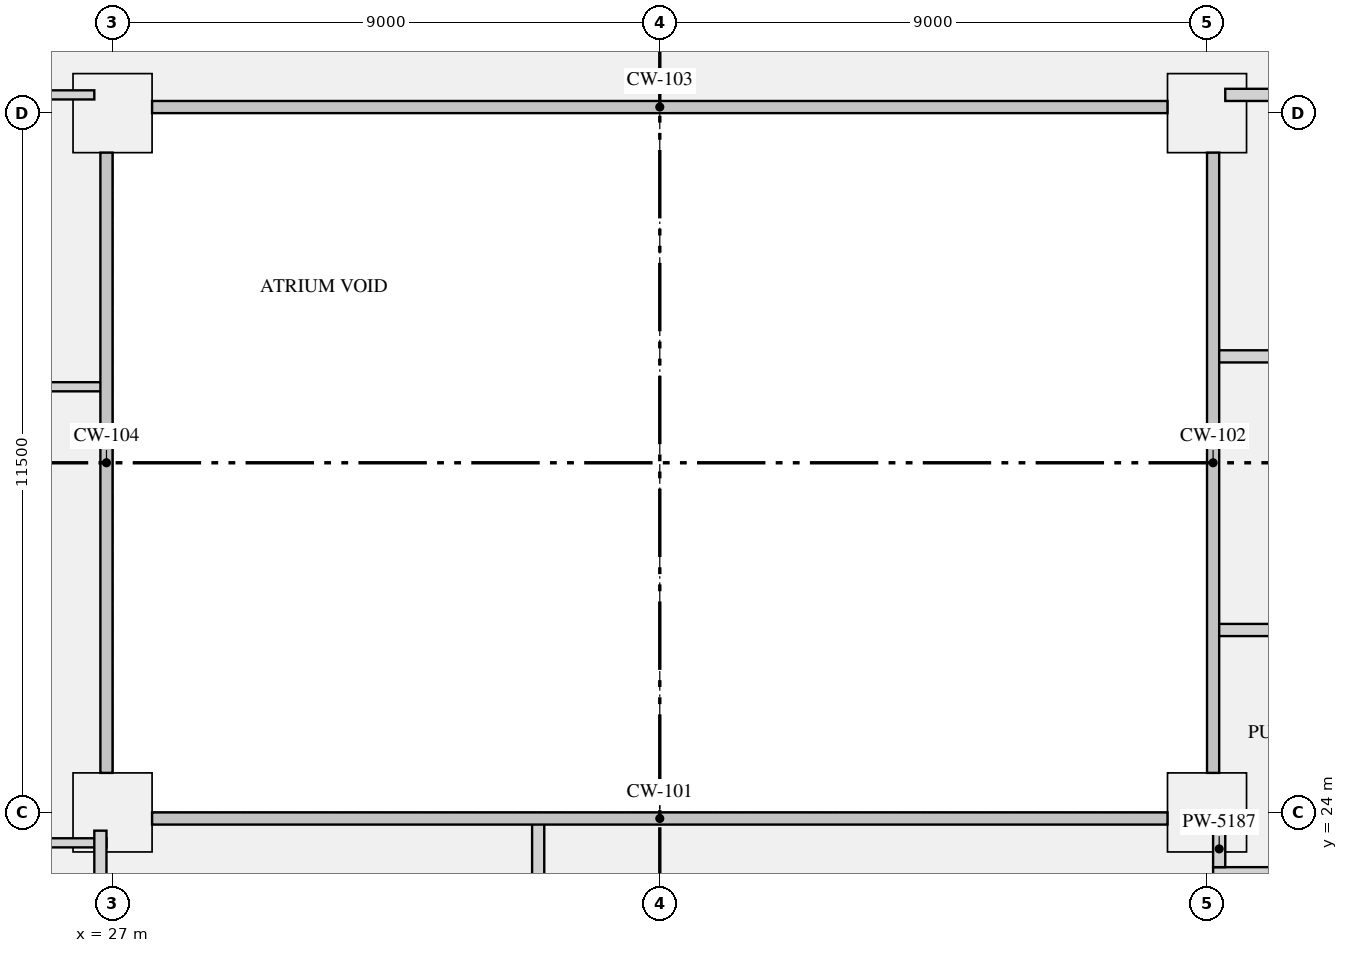
"""IFC4 building model, lengths in metres.
Left out: names, types, materials, properties, quantities, classifications, styles, units other than length and angle.
Written with IfcOpenShell. Run it as: python <this file> out.ifc"""

import sys

from ifc_helpers import new_model, si_unit, direction, frame, frame_2d, origin, origin_2d, place, context, subcontext, project, spatial, rectangle, extrude, element, save


model = new_model("IFC4")
c1 = context("Model", 3, precision=1e-05, world=origin(), true_north=direction((0.0, 1.0)))
c2 = subcontext(c1, "Body", "Model", "MODEL_VIEW")
j1 = project(units=[si_unit("LENGTHUNIT", "METRE"), si_unit("PLANEANGLEUNIT", "RADIAN")], contexts=[c1])
p1 = place(None, origin())
s1 = spatial("IfcSite", under=j1, at=p1, CompositionType="ELEMENT")
p2 = place(p1, origin())
s2 = spatial("IfcBuilding", under=s1, at=p2, CompositionType="ELEMENT")
p3 = place(p2, frame((0.0, 0.0, 137.1)))
s3 = spatial("IfcBuildingStorey", under=s2, at=p3, CompositionType="ELEMENT", Elevation=137.1)
for number, where, z_axis, x_axis in (
    (1, (27.0, 24.0, 0.0), (0.0, 0.0, 1.0), (1.0, 0.0, 0.0)),
    (2, (45.0, 24.0, 0.0), (0.0, 0.0, 1.0), (1.0, 0.0, 0.0)),
    (3, (27.0, 35.5, 0.0), (0.0, 0.0, 1.0), (1.0, 0.0, 0.0)),
    (4, (45.0, 35.5, 0.0), (0.0, 0.0, 1.0), (1.0, 0.0, 0.0)),
):
    element("IfcColumn", number, at=place(p3, frame(where, z_axis=z_axis, x_axis=x_axis)), inside=s3, PredefinedType="COLUMN", context=c2, shape_type="SweptSolid", body=[
        extrude(rectangle(XDim=1.3, YDim=1.3, at=origin_2d()), origin(), (0.0, 0.0, 1.0), 4.2),
    ])
p4 = place(p3, frame((45.1, 23.0, 0.0), z_axis=(0.0, 0.0, 1.0), x_axis=(1.0, 0.0, 0.0)))
e5 = element("IfcWall", 5, at=p4, inside=s3, PredefinedType="PARTITIONING", context=c2, shape_type="SweptSolid", body=[
    extrude(rectangle(XDim=7.275, YDim=0.2, at=frame_2d((3.637, 0.0))), origin(), (0.0, 0.0, 1.0), 3.7),
])
p5 = place(p3, frame((19.625, 23.5, 0.0), z_axis=(0.0, 0.0, 1.0), x_axis=(1.0, 0.0, 0.0)))
e6 = element("IfcWall", 6, at=p5, inside=s3, PredefinedType="PARTITIONING", context=c2, shape_type="SweptSolid", body=[
    extrude(rectangle(XDim=7.275, YDim=0.15, at=frame_2d((3.637, 0.0))), origin(), (0.0, 0.0, 1.0), 3.7),
])
p6 = place(p3, frame((45.096, 27.0, 0.0), z_axis=(0.0, 0.0, 1.0), x_axis=(1.0, 0.0, 0.0)))
e7 = element("IfcWall", 7, at=p6, inside=s3, PredefinedType="PARTITIONING", context=c2, shape_type="SweptSolid", body=[
    extrude(rectangle(XDim=7.279, YDim=0.2, at=frame_2d((3.64, 0.0))), origin(), (0.0, 0.0, 1.0), 3.7),
])
p7 = place(p3, frame((19.625, 31.0, 0.0), z_axis=(0.0, 0.0, 1.0), x_axis=(1.0, 0.0, 0.0)))
e8 = element("IfcWall", 8, at=p7, inside=s3, PredefinedType="PARTITIONING", context=c2, shape_type="SweptSolid", body=[
    extrude(rectangle(XDim=7.279, YDim=0.15, at=frame_2d((3.64, 0.0))), origin(), (0.0, 0.0, 1.0), 3.7),
])
p8 = place(p3, frame((45.096, 31.5, 0.0), z_axis=(0.0, 0.0, 1.0), x_axis=(1.0, 0.0, 0.0)))
e9 = element("IfcWall", 9, at=p8, inside=s3, PredefinedType="PARTITIONING", context=c2, shape_type="SweptSolid", body=[
    extrude(rectangle(XDim=7.279, YDim=0.2, at=frame_2d((3.64, 0.0))), origin(), (0.0, 0.0, 1.0), 3.7),
])
p9 = place(p3, frame((45.3, 35.8, 0.0), z_axis=(0.0, 0.0, 1.0), x_axis=(1.0, 0.0, 0.0)))
e10 = element("IfcWall", 10, at=p9, inside=s3, PredefinedType="PARTITIONING", context=c2, shape_type="SweptSolid", body=[
    extrude(rectangle(XDim=7.1, YDim=0.2, at=frame_2d((3.55, 0.0))), origin(), (0.0, 0.0, 1.0), 3.7),
])
p10 = place(p9, frame((3.0, 0.0, 0.0)))
e11 = element("IfcOpeningElement", 11, at=p10, cuts=e10, PredefinedType="OPENING", context=c2, shape_type="SweptSolid", body=[
    extrude(rectangle(XDim=1.0, YDim=2.1, at=frame_2d((0.5, 1.05))), frame((0.0, 0.11, 0.0), z_axis=(0.0, -1.0, 0.0), x_axis=(1.0, 0.0, 0.0)), (0.0, 0.0, 1.0), 0.22),
])
p11 = place(p3, frame((19.625, 35.8, 0.0), z_axis=(0.0, 0.0, 1.0), x_axis=(1.0, 0.0, 0.0)))
e12 = element("IfcWall", 12, at=p11, inside=s3, PredefinedType="PARTITIONING", context=c2, shape_type="SweptSolid", body=[
    extrude(rectangle(XDim=7.075, YDim=0.15, at=frame_2d((3.538, 0.0))), origin(), (0.0, 0.0, 1.0), 3.7),
])
p12 = place(p11, frame((3.125, 0.0, 0.0)))
e13 = element("IfcOpeningElement", 13, at=p12, cuts=e12, PredefinedType="OPENING", context=c2, shape_type="SweptSolid", body=[
    extrude(rectangle(XDim=0.9, YDim=2.1, at=frame_2d((0.45, 1.05))), frame((0.0, 0.085, 0.0), z_axis=(0.0, -1.0, 0.0), x_axis=(1.0, 0.0, 0.0)), (0.0, 0.0, 1.0), 0.17),
])
p13 = place(p3, frame((26.8, 18.6, 0.0), z_axis=(0.0, 0.0, 1.0), x_axis=(0.0, 1.0, 0.0)))
e14 = element("IfcWall", 14, at=p13, inside=s3, PredefinedType="PARTITIONING", context=c2, shape_type="SweptSolid", body=[
    extrude(rectangle(XDim=5.1, YDim=0.2, at=frame_2d((2.55, 0.0))), origin(), (0.0, 0.0, 1.0), 3.7),
])
p14 = place(p3, frame((34.0, 18.6, 0.0), z_axis=(0.0, 0.0, 1.0), x_axis=(0.0, 1.0, 0.0)))
e15 = element("IfcWall", 15, at=p14, inside=s3, PredefinedType="PARTITIONING", context=c2, shape_type="SweptSolid", body=[
    extrude(rectangle(XDim=5.304, YDim=0.2, at=frame_2d((2.652, 0.0))), origin(), (0.0, 0.0, 1.0), 3.7),
])
p15 = place(p3, frame((45.2, 23.1, 0.0), z_axis=(0.0, 0.0, 1.0), x_axis=(0.0, 1.0, 0.0)))
e16 = element("IfcWall", 16, at=p15, inside=s3, PredefinedType="PARTITIONING", context=c2, shape_type="SweptSolid", body=[
    extrude(rectangle(XDim=0.6, YDim=0.2, at=frame_2d((0.3, 0.0))), origin(), (0.0, 0.0, 1.0), 3.7),
])
save(model, sys.argv[1])
